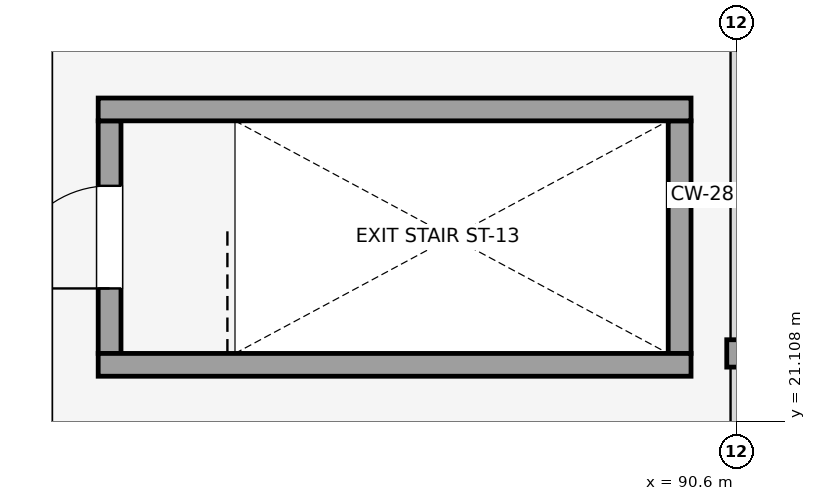
"""IFC4 building model, lengths in metres.
Left out: names, types, materials, properties, quantities, classifications, styles, units other than length and angle.
Written with IfcOpenShell. Run it as: python <this file> out.ifc"""

import sys

from ifc_helpers import new_model, si_unit, direction, frame, frame_2d, origin, place, context, subcontext, project, spatial, rectangle, extrude, element, fill, save


model = new_model("IFC4")
c1 = context("Model", 3, precision=1e-05, world=origin(), true_north=direction((0.0, 1.0)))
c2 = subcontext(c1, "Body", "Model", "MODEL_VIEW")
j1 = project(units=[si_unit("LENGTHUNIT", "METRE"), si_unit("PLANEANGLEUNIT", "RADIAN")], contexts=[c1])
p1 = place(None, origin())
s1 = spatial("IfcSite", under=j1, at=p1, CompositionType="ELEMENT")
p2 = place(p1, origin())
s2 = spatial("IfcBuilding", under=s1, at=p2, CompositionType="ELEMENT")
p3 = place(p2, frame((0.0, 0.0, 9.0)))
s3 = spatial("IfcBuildingStorey", under=s2, at=p3, CompositionType="ELEMENT", Elevation=9.0)
p4 = place(p3, frame((90.6, 21.82, 0.0), z_axis=(0.0, 0.0, 1.0), x_axis=(0.0, 1.0, 0.0)))
e1 = element("IfcWall", 1, at=p4, inside=s3, PredefinedType="SOLIDWALL", context=c2, shape_type="SweptSolid", body=[
    extrude(rectangle(XDim=0.36, YDim=0.26, at=frame_2d((0.18, 0.0))), origin(), (0.0, 0.0, 1.0), 3.42),
])
p5 = place(p3, frame((82.35, 22.0, 0.0), z_axis=(0.0, 0.0, 1.0), x_axis=(0.0, 1.0, 0.0)))
e2 = element("IfcWall", 2, at=p5, inside=s3, PredefinedType="SHEAR", context=c2, shape_type="SweptSolid", body=[
    extrude(rectangle(XDim=3.06, YDim=0.3, at=frame_2d((1.53, 0.0))), origin(), (0.0, 0.0, 1.0), 4.8),
])
p6 = place(p5, frame((0.855, 0.0, 0.0)))
e3 = element("IfcOpeningElement", 3, at=p6, cuts=e2, PredefinedType="OPENING", context=c2, shape_type="SweptSolid", body=[
    extrude(rectangle(XDim=1.35, YDim=2.15, at=frame_2d((0.675, 1.075))), frame((0.0, 0.16, 0.0), z_axis=(0.0, -1.0, 0.0), x_axis=(1.0, 0.0, 0.0)), (0.0, 0.0, 1.0), 0.32),
])
p7 = place(p3, frame((89.85, 22.0, 0.0), z_axis=(0.0, 0.0, 1.0), x_axis=(0.0, 1.0, 0.0)))
e4 = element("IfcWall", 4, at=p7, inside=s3, PredefinedType="SHEAR", context=c2, shape_type="SweptSolid", body=[
    extrude(rectangle(XDim=3.06, YDim=0.3, at=frame_2d((1.53, 0.0))), origin(), (0.0, 0.0, 1.0), 4.8),
])
for number, where, z_axis, x_axis in (
    (5, (82.2, 21.85, 0.0), (0.0, 0.0, 1.0), (1.0, 0.0, 0.0)),
    (6, (82.2, 25.21, 0.0), (0.0, 0.0, 1.0), (1.0, 0.0, 0.0)),
):
    element("IfcWall", number, at=place(p3, frame(where, z_axis=z_axis, x_axis=x_axis)), inside=s3, PredefinedType="SHEAR", context=c2, shape_type="SweptSolid", body=[
        extrude(rectangle(XDim=7.8, YDim=0.3, at=frame_2d((3.9, 0.0))), origin(), (0.0, 0.0, 1.0), 4.8),
    ])
p8 = place(p6, origin())
e7 = element("IfcDoor", 7, at=p8, inside=s3, OperationType="SINGLE_SWING_LEFT", PredefinedType="DOOR", context=c2, shape_type="SweptSolid", body=[
    extrude(rectangle(XDim=1.35, YDim=2.15, at=frame_2d((0.675, 1.075))), frame((0.0, 0.025, 0.0), z_axis=(0.0, -1.0, 0.0), x_axis=(1.0, 0.0, 0.0)), (0.0, 0.0, 1.0), 0.05),
])
fill(e3, e7)
save(model, sys.argv[1])
